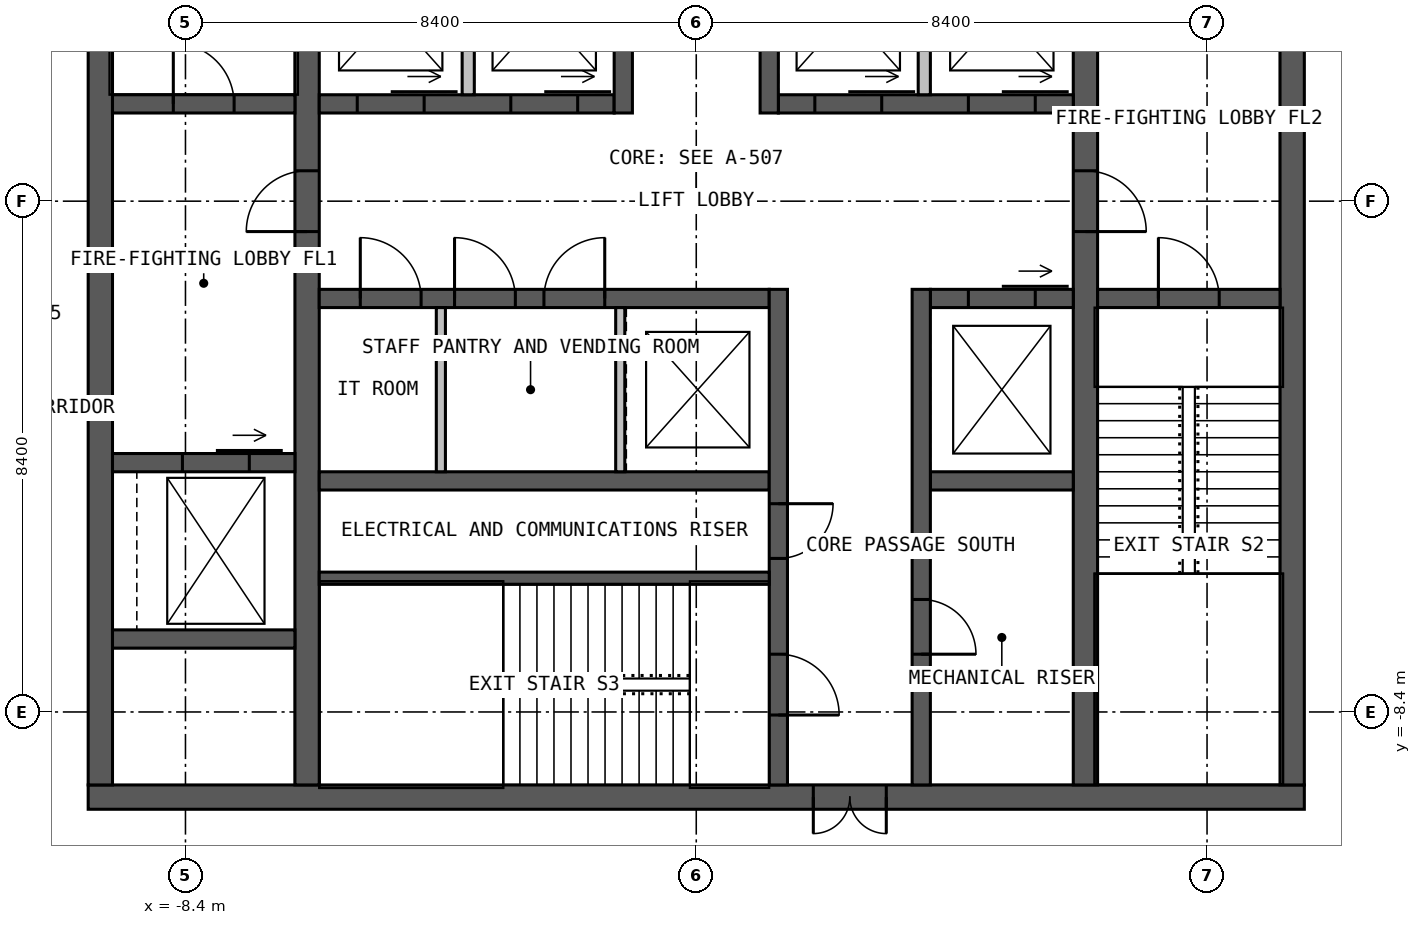
"""IFC4 building model, lengths in metres.
Left out: names, types, materials, properties, quantities, classifications, styles, units other than length and angle.
Written with IfcOpenShell. Run it as: python <this file> out.ifc"""

import sys

from ifc_helpers import new_model, si_unit, direction, frame, frame_2d, origin, place, context, subcontext, project, spatial, rectangle, extrude, element, fill, save


model = new_model("IFC4")
c1 = context("Model", 3, precision=1e-05, world=origin(), true_north=direction((0.0, 1.0)))
c2 = subcontext(c1, "Body", "Model", "MODEL_VIEW")
j1 = project(units=[si_unit("LENGTHUNIT", "METRE"), si_unit("PLANEANGLEUNIT", "RADIAN")], contexts=[c1])
p1 = place(None, origin())
s1 = spatial("IfcSite", under=j1, at=p1, CompositionType="ELEMENT")
p2 = place(p1, origin())
s2 = spatial("IfcBuilding", under=s1, at=p2, CompositionType="ELEMENT")
p3 = place(p2, frame((0.0, 0.0, 280.0)))
s3 = spatial("IfcBuildingStorey", under=s2, at=p3, CompositionType="ELEMENT", Elevation=280.0)
p4 = place(p3, frame((10.0, -9.8, 0.0), z_axis=(0.0, 0.0, 1.0), x_axis=(-1.0, 0.0, 0.0)))
e1 = element("IfcWall", 1, at=p4, inside=s3, PredefinedType="SOLIDWALL", context=c2, shape_type="SweptSolid", body=[
    extrude(rectangle(XDim=20.0, YDim=0.4, at=frame_2d((10.0, 0.0))), origin(), (0.0, 0.0, 1.0), 4.0),
])
p5 = place(p4, frame((6.875, 0.0, 0.0)))
e2 = element("IfcOpeningElement", 2, at=p5, cuts=e1, PredefinedType="OPENING", context=c2, shape_type="SweptSolid", body=[
    extrude(rectangle(XDim=1.2, YDim=2.2, at=frame_2d((0.6, 1.1))), frame((0.0, 0.21, 0.0), z_axis=(0.0, -1.0, 0.0), x_axis=(1.0, 0.0, 0.0)), (0.0, 0.0, 1.0), 0.42),
])
for number, where, z_axis, x_axis in (
    (3, (9.8, -9.6, 0.0), (0.0, 0.0, 1.0), (0.0, 1.0, 0.0)),
    (4, (-9.8, 9.6, 0.0), (0.0, 0.0, 1.0), (0.0, -1.0, 0.0)),
):
    element("IfcWall", number, at=place(p3, frame(where, z_axis=z_axis, x_axis=x_axis)), inside=s3, PredefinedType="SOLIDWALL", context=c2, shape_type="SweptSolid", body=[
        extrude(rectangle(XDim=19.2, YDim=0.4, at=frame_2d((9.6, 0.0))), origin(), (0.0, 0.0, 1.0), 4.0),
    ])
p6 = place(p3, frame((-6.4, -9.6, 0.0), z_axis=(0.0, 0.0, 1.0), x_axis=(0.0, 1.0, 0.0)))
e5 = element("IfcWall", 5, at=p6, inside=s3, PredefinedType="SOLIDWALL", context=c2, shape_type="SweptSolid", body=[
    extrude(rectangle(XDim=19.2, YDim=0.4, at=frame_2d((9.6, 0.0))), origin(), (0.0, 0.0, 1.0), 4.0),
])
p7 = place(p6, frame((9.1, 0.0, 0.0)))
e6 = element("IfcOpeningElement", 6, at=p7, cuts=e5, PredefinedType="OPENING", context=c2, shape_type="SweptSolid", body=[
    extrude(rectangle(XDim=1.0, YDim=2.2, at=frame_2d((0.5, 1.1))), frame((0.0, 0.21, 0.0), z_axis=(0.0, -1.0, 0.0), x_axis=(1.0, 0.0, 0.0)), (0.0, 0.0, 1.0), 0.42),
])
p8 = place(p3, frame((6.4, 9.6, 0.0), z_axis=(0.0, 0.0, 1.0), x_axis=(0.0, -1.0, 0.0)))
e7 = element("IfcWall", 7, at=p8, inside=s3, PredefinedType="SOLIDWALL", context=c2, shape_type="SweptSolid", body=[
    extrude(rectangle(XDim=19.2, YDim=0.4, at=frame_2d((9.6, 0.0))), origin(), (0.0, 0.0, 1.0), 4.0),
])
p9 = place(p8, frame((9.1, 0.0, 0.0)))
e8 = element("IfcOpeningElement", 8, at=p9, cuts=e7, PredefinedType="OPENING", context=c2, shape_type="SweptSolid", body=[
    extrude(rectangle(XDim=1.0, YDim=2.2, at=frame_2d((0.5, 1.1))), frame((0.0, 0.21, 0.0), z_axis=(0.0, -1.0, 0.0), x_axis=(1.0, 0.0, 0.0)), (0.0, 0.0, 1.0), 0.42),
])
p10 = place(p3, frame((-6.2, 1.6, 0.0), z_axis=(0.0, 0.0, 1.0), x_axis=(1.0, 0.0, 0.0)))
e9 = element("IfcWall", 9, at=p10, inside=s3, PredefinedType="SOLIDWALL", context=c2, shape_type="SweptSolid", body=[
    extrude(rectangle(XDim=4.85, YDim=0.3, at=frame_2d((2.425, 0.0))), origin(), (0.0, 0.0, 1.0), 4.0),
])
p11 = place(p10, frame((0.625, 0.0, 0.0)))
e10 = element("IfcOpeningElement", 10, at=p11, cuts=e9, PredefinedType="OPENING", context=c2, shape_type="SweptSolid", body=[
    extrude(rectangle(XDim=1.1, YDim=2.2, at=frame_2d((0.55, 1.1))), frame((0.0, 0.16, 0.0), z_axis=(0.0, -1.0, 0.0), x_axis=(1.0, 0.0, 0.0)), (0.0, 0.0, 1.0), 0.32),
])
p12 = place(p10, frame((3.15, 0.0, 0.0)))
e11 = element("IfcOpeningElement", 11, at=p12, cuts=e9, PredefinedType="OPENING", context=c2, shape_type="SweptSolid", body=[
    extrude(rectangle(XDim=1.1, YDim=2.2, at=frame_2d((0.55, 1.1))), frame((0.0, 0.16, 0.0), z_axis=(0.0, -1.0, 0.0), x_axis=(1.0, 0.0, 0.0)), (0.0, 0.0, 1.0), 0.32),
])
p13 = place(p3, frame((1.35, 1.6, 0.0), z_axis=(0.0, 0.0, 1.0), x_axis=(1.0, 0.0, 0.0)))
e12 = element("IfcWall", 12, at=p13, inside=s3, PredefinedType="SOLIDWALL", context=c2, shape_type="SweptSolid", body=[
    extrude(rectangle(XDim=4.85, YDim=0.3, at=frame_2d((2.425, 0.0))), origin(), (0.0, 0.0, 1.0), 4.0),
])
p14 = place(p13, frame((0.6, 0.0, 0.0)))
e13 = element("IfcOpeningElement", 13, at=p14, cuts=e12, PredefinedType="OPENING", context=c2, shape_type="SweptSolid", body=[
    extrude(rectangle(XDim=1.1, YDim=2.2, at=frame_2d((0.55, 1.1))), frame((0.0, 0.16, 0.0), z_axis=(0.0, -1.0, 0.0), x_axis=(1.0, 0.0, 0.0)), (0.0, 0.0, 1.0), 0.32),
])
p15 = place(p13, frame((3.125, 0.0, 0.0)))
e14 = element("IfcOpeningElement", 14, at=p15, cuts=e12, PredefinedType="OPENING", context=c2, shape_type="SweptSolid", body=[
    extrude(rectangle(XDim=1.1, YDim=2.2, at=frame_2d((0.55, 1.1))), frame((0.0, 0.16, 0.0), z_axis=(0.0, -1.0, 0.0), x_axis=(1.0, 0.0, 0.0)), (0.0, 0.0, 1.0), 0.32),
])
p16 = place(p3, frame((-1.2, 1.45, 0.0), z_axis=(0.0, 0.0, 1.0), x_axis=(0.0, 1.0, 0.0)))
e15 = element("IfcWall", 15, at=p16, inside=s3, PredefinedType="SOLIDWALL", context=c2, shape_type="SweptSolid", body=[
    extrude(rectangle(XDim=8.15, YDim=0.3, at=frame_2d((4.075, 0.0))), origin(), (0.0, 0.0, 1.0), 4.0),
])
p17 = place(p16, frame((5.05, 0.0, 0.0)))
e16 = element("IfcOpeningElement", 16, at=p17, cuts=e15, PredefinedType="OPENING", context=c2, shape_type="SweptSolid", body=[
    extrude(rectangle(XDim=1.0, YDim=2.2, at=frame_2d((0.5, 1.1))), frame((0.0, 0.16, 0.0), z_axis=(0.0, -1.0, 0.0), x_axis=(1.0, 0.0, 0.0)), (0.0, 0.0, 1.0), 0.32),
])
p18 = place(p3, frame((1.2, 1.45, 0.0), z_axis=(0.0, 0.0, 1.0), x_axis=(0.0, 1.0, 0.0)))
e17 = element("IfcWall", 17, at=p18, inside=s3, PredefinedType="SOLIDWALL", context=c2, shape_type="SweptSolid", body=[
    extrude(rectangle(XDim=8.15, YDim=0.3, at=frame_2d((4.075, 0.0))), origin(), (0.0, 0.0, 1.0), 4.0),
])
p19 = place(p18, frame((3.8, 0.0, 0.0)))
e18 = element("IfcOpeningElement", 18, at=p19, cuts=e17, PredefinedType="OPENING", context=c2, shape_type="SweptSolid", body=[
    extrude(rectangle(XDim=1.0, YDim=2.2, at=frame_2d((0.5, 1.1))), frame((0.0, 0.16, 0.0), z_axis=(0.0, -1.0, 0.0), x_axis=(1.0, 0.0, 0.0)), (0.0, 0.0, 1.0), 0.32),
])
p20 = place(p18, frame((6.15, 0.0, 0.0)))
e19 = element("IfcOpeningElement", 19, at=p20, cuts=e17, PredefinedType="OPENING", context=c2, shape_type="SweptSolid", body=[
    extrude(rectangle(XDim=1.0, YDim=2.2, at=frame_2d((0.5, 1.1))), frame((0.0, 0.16, 0.0), z_axis=(0.0, -1.0, 0.0), x_axis=(1.0, 0.0, 0.0)), (0.0, 0.0, 1.0), 0.32),
])
p21 = place(p3, frame((-6.2, -1.6, 0.0), z_axis=(0.0, 0.0, 1.0), x_axis=(1.0, 0.0, 0.0)))
e20 = element("IfcWall", 20, at=p21, inside=s3, PredefinedType="SOLIDWALL", context=c2, shape_type="SweptSolid", body=[
    extrude(rectangle(XDim=7.4, YDim=0.3, at=frame_2d((3.7, 0.0))), origin(), (0.0, 0.0, 1.0), 4.0),
])
p22 = place(p21, frame((0.675, 0.0, 0.0)))
e21 = element("IfcOpeningElement", 21, at=p22, cuts=e20, PredefinedType="OPENING", context=c2, shape_type="SweptSolid", body=[
    extrude(rectangle(XDim=1.0, YDim=2.2, at=frame_2d((0.5, 1.1))), frame((0.0, 0.16, 0.0), z_axis=(0.0, -1.0, 0.0), x_axis=(1.0, 0.0, 0.0)), (0.0, 0.0, 1.0), 0.32),
])
p23 = place(p21, frame((2.225, 0.0, 0.0)))
e22 = element("IfcOpeningElement", 22, at=p23, cuts=e20, PredefinedType="OPENING", context=c2, shape_type="SweptSolid", body=[
    extrude(rectangle(XDim=1.0, YDim=2.2, at=frame_2d((0.5, 1.1))), frame((0.0, 0.16, 0.0), z_axis=(0.0, -1.0, 0.0), x_axis=(1.0, 0.0, 0.0)), (0.0, 0.0, 1.0), 0.32),
])
p24 = place(p21, frame((3.695, 0.0, 0.0)))
e23 = element("IfcOpeningElement", 23, at=p24, cuts=e20, PredefinedType="OPENING", context=c2, shape_type="SweptSolid", body=[
    extrude(rectangle(XDim=1.0, YDim=2.2, at=frame_2d((0.5, 1.1))), frame((0.0, 0.16, 0.0), z_axis=(0.0, -1.0, 0.0), x_axis=(1.0, 0.0, 0.0)), (0.0, 0.0, 1.0), 0.32),
])
p25 = place(p3, frame((3.85, -1.6, 0.0), z_axis=(0.0, 0.0, 1.0), x_axis=(1.0, 0.0, 0.0)))
e24 = element("IfcWall", 24, at=p25, inside=s3, PredefinedType="SOLIDWALL", context=c2, shape_type="SweptSolid", body=[
    extrude(rectangle(XDim=2.35, YDim=0.3, at=frame_2d((1.175, 0.0))), origin(), (0.0, 0.0, 1.0), 4.0),
])
p26 = place(p25, frame((0.625, 0.0, 0.0)))
e25 = element("IfcOpeningElement", 25, at=p26, cuts=e24, PredefinedType="OPENING", context=c2, shape_type="SweptSolid", body=[
    extrude(rectangle(XDim=1.1, YDim=2.2, at=frame_2d((0.55, 1.1))), frame((0.0, 0.16, 0.0), z_axis=(0.0, -1.0, 0.0), x_axis=(1.0, 0.0, 0.0)), (0.0, 0.0, 1.0), 0.32),
])
p27 = place(p3, frame((-6.2, -4.6, 0.0), z_axis=(0.0, 0.0, 1.0), x_axis=(1.0, 0.0, 0.0)))
e26 = element("IfcWall", 26, at=p27, inside=s3, PredefinedType="SOLIDWALL", context=c2, shape_type="SweptSolid", body=[
    extrude(rectangle(XDim=7.4, YDim=0.3, at=frame_2d((3.7, 0.0))), origin(), (0.0, 0.0, 1.0), 4.0),
])
p28 = place(p3, frame((3.85, -4.6, 0.0), z_axis=(0.0, 0.0, 1.0), x_axis=(1.0, 0.0, 0.0)))
e27 = element("IfcWall", 27, at=p28, inside=s3, PredefinedType="SOLIDWALL", context=c2, shape_type="SweptSolid", body=[
    extrude(rectangle(XDim=2.35, YDim=0.3, at=frame_2d((1.175, 0.0))), origin(), (0.0, 0.0, 1.0), 4.0),
])
p29 = place(p3, frame((1.35, -1.45, 0.0), z_axis=(0.0, 0.0, 1.0), x_axis=(0.0, -1.0, 0.0)))
e28 = element("IfcWall", 28, at=p29, inside=s3, PredefinedType="SOLIDWALL", context=c2, shape_type="SweptSolid", body=[
    extrude(rectangle(XDim=8.15, YDim=0.3, at=frame_2d((4.075, 0.0))), origin(), (0.0, 0.0, 1.0), 4.0),
])
p30 = place(p29, frame((6.0, 0.0, 0.0)))
e29 = element("IfcOpeningElement", 29, at=p30, cuts=e28, PredefinedType="OPENING", context=c2, shape_type="SweptSolid", body=[
    extrude(rectangle(XDim=1.0, YDim=2.2, at=frame_2d((0.5, 1.1))), frame((0.0, 0.16, 0.0), z_axis=(0.0, -1.0, 0.0), x_axis=(1.0, 0.0, 0.0)), (0.0, 0.0, 1.0), 0.32),
])
p31 = place(p29, frame((3.525, 0.0, 0.0)))
e30 = element("IfcOpeningElement", 30, at=p31, cuts=e28, PredefinedType="OPENING", context=c2, shape_type="SweptSolid", body=[
    extrude(rectangle(XDim=0.9, YDim=2.2, at=frame_2d((0.45, 1.1))), frame((0.0, 0.16, 0.0), z_axis=(0.0, -1.0, 0.0), x_axis=(1.0, 0.0, 0.0)), (0.0, 0.0, 1.0), 0.32),
])
p32 = place(p3, frame((3.7, -1.45, 0.0), z_axis=(0.0, 0.0, 1.0), x_axis=(0.0, -1.0, 0.0)))
e31 = element("IfcWall", 31, at=p32, inside=s3, PredefinedType="SOLIDWALL", context=c2, shape_type="SweptSolid", body=[
    extrude(rectangle(XDim=8.15, YDim=0.3, at=frame_2d((4.075, 0.0))), origin(), (0.0, 0.0, 1.0), 4.0),
])
p33 = place(p32, frame((5.1, 0.0, 0.0)))
e32 = element("IfcOpeningElement", 32, at=p33, cuts=e31, PredefinedType="OPENING", context=c2, shape_type="SweptSolid", body=[
    extrude(rectangle(XDim=0.9, YDim=2.2, at=frame_2d((0.45, 1.1))), frame((0.0, 0.16, 0.0), z_axis=(0.0, -1.0, 0.0), x_axis=(1.0, 0.0, 0.0)), (0.0, 0.0, 1.0), 0.32),
])
p34 = place(p3, frame((-6.2, -6.2, 0.0), z_axis=(0.0, 0.0, 1.0), x_axis=(1.0, 0.0, 0.0)))
e33 = element("IfcWall", 33, at=p34, inside=s3, PredefinedType="SOLIDWALL", context=c2, shape_type="SweptSolid", body=[
    extrude(rectangle(XDim=7.4, YDim=0.2, at=frame_2d((3.7, 0.0))), origin(), (0.0, 0.0, 1.0), 4.0),
])
p35 = place(p3, frame((-9.6, 1.6, 0.0), z_axis=(0.0, 0.0, 1.0), x_axis=(1.0, 0.0, 0.0)))
e34 = element("IfcWall", 34, at=p35, inside=s3, PredefinedType="SOLIDWALL", context=c2, shape_type="SweptSolid", body=[
    extrude(rectangle(XDim=3.0, YDim=0.3, at=frame_2d((1.5, 0.0))), origin(), (0.0, 0.0, 1.0), 4.0),
])
p36 = place(p35, frame((1.0, 0.0, 0.0)))
e35 = element("IfcOpeningElement", 35, at=p36, cuts=e34, PredefinedType="OPENING", context=c2, shape_type="SweptSolid", body=[
    extrude(rectangle(XDim=1.0, YDim=2.2, at=frame_2d((0.5, 1.1))), frame((0.0, 0.16, 0.0), z_axis=(0.0, -1.0, 0.0), x_axis=(1.0, 0.0, 0.0)), (0.0, 0.0, 1.0), 0.32),
])
p37 = place(p3, frame((6.6, -1.6, 0.0), z_axis=(0.0, 0.0, 1.0), x_axis=(1.0, 0.0, 0.0)))
e36 = element("IfcWall", 36, at=p37, inside=s3, PredefinedType="SOLIDWALL", context=c2, shape_type="SweptSolid", body=[
    extrude(rectangle(XDim=3.0, YDim=0.3, at=frame_2d((1.5, 0.0))), origin(), (0.0, 0.0, 1.0), 4.0),
])
p38 = place(p37, frame((1.0, 0.0, 0.0)))
e37 = element("IfcOpeningElement", 37, at=p38, cuts=e36, PredefinedType="OPENING", context=c2, shape_type="SweptSolid", body=[
    extrude(rectangle(XDim=1.0, YDim=2.2, at=frame_2d((0.5, 1.1))), frame((0.0, 0.16, 0.0), z_axis=(0.0, -1.0, 0.0), x_axis=(1.0, 0.0, 0.0)), (0.0, 0.0, 1.0), 0.32),
])
p39 = place(p3, frame((-9.6, -4.3, 0.0), z_axis=(0.0, 0.0, 1.0), x_axis=(1.0, 0.0, 0.0)))
e38 = element("IfcWall", 38, at=p39, inside=s3, PredefinedType="SOLIDWALL", context=c2, shape_type="SweptSolid", body=[
    extrude(rectangle(XDim=3.0, YDim=0.3, at=frame_2d((1.5, 0.0))), origin(), (0.0, 0.0, 1.0), 4.0),
])
p40 = place(p39, frame((1.15, 0.0, 0.0)))
e39 = element("IfcOpeningElement", 39, at=p40, cuts=e38, PredefinedType="OPENING", context=c2, shape_type="SweptSolid", body=[
    extrude(rectangle(XDim=1.1, YDim=2.2, at=frame_2d((0.55, 1.1))), frame((0.0, 0.16, 0.0), z_axis=(0.0, -1.0, 0.0), x_axis=(1.0, 0.0, 0.0)), (0.0, 0.0, 1.0), 0.32),
])
p41 = place(p3, frame((-9.6, -7.2, 0.0), z_axis=(0.0, 0.0, 1.0), x_axis=(1.0, 0.0, 0.0)))
e40 = element("IfcWall", 40, at=p41, inside=s3, PredefinedType="SOLIDWALL", context=c2, shape_type="SweptSolid", body=[
    extrude(rectangle(XDim=3.0, YDim=0.3, at=frame_2d((1.5, 0.0))), origin(), (0.0, 0.0, 1.0), 4.0),
])
for number, where, z_axis, x_axis in (
    (41, (-3.75, 1.75, 0.0), (0.0, 0.0, 1.0), (0.0, 1.0, 0.0)),
    (42, (3.75, 1.75, 0.0), (0.0, 0.0, 1.0), (0.0, 1.0, 0.0)),
):
    element("IfcWall", number, at=place(p3, frame(where, z_axis=z_axis, x_axis=x_axis)), inside=s3, PredefinedType="SOLIDWALL", context=c2, shape_type="SweptSolid", body=[
        extrude(rectangle(XDim=2.7, YDim=0.2, at=frame_2d((1.35, 0.0))), origin(), (0.0, 0.0, 1.0), 3.75),
    ])
for number, where, z_axis, x_axis in (
    (43, (-4.2, -1.75, 0.0), (0.0, 0.0, 1.0), (0.0, -1.0, 0.0)),
    (44, (-1.25, -1.75, 0.0), (0.0, 0.0, 1.0), (0.0, -1.0, 0.0)),
):
    element("IfcWall", number, at=place(p3, frame(where, z_axis=z_axis, x_axis=x_axis)), inside=s3, PredefinedType="PARTITIONING", context=c2, shape_type="SweptSolid", body=[
        extrude(rectangle(XDim=2.7, YDim=0.15, at=frame_2d((1.35, 0.0))), origin(), (0.0, 0.0, 1.0), 3.75),
    ])
p42 = place(p5, origin())
e45 = element("IfcDoor", 45, at=p42, inside=s3, OperationType="DOUBLE_DOOR_SINGLE_SWING", PredefinedType="DOOR", context=c2, shape_type="SweptSolid", body=[
    extrude(rectangle(XDim=1.2, YDim=2.2, at=frame_2d((0.6, 1.1))), frame((0.0, 0.025, 0.0), z_axis=(0.0, -1.0, 0.0), x_axis=(1.0, 0.0, 0.0)), (0.0, 0.0, 1.0), 0.05),
])
fill(e2, e45)
p43 = place(p7, origin())
e46 = element("IfcDoor", 46, at=p43, inside=s3, OperationType="SINGLE_SWING_LEFT", PredefinedType="DOOR", context=c2, shape_type="SweptSolid", body=[
    extrude(rectangle(XDim=1.0, YDim=2.2, at=frame_2d((0.5, 1.1))), frame((0.0, 0.025, 0.0), z_axis=(0.0, -1.0, 0.0), x_axis=(1.0, 0.0, 0.0)), (0.0, 0.0, 1.0), 0.05),
])
fill(e6, e46)
p44 = place(p9, origin())
e47 = element("IfcDoor", 47, at=p44, inside=s3, OperationType="SINGLE_SWING_RIGHT", PredefinedType="DOOR", context=c2, shape_type="SweptSolid", body=[
    extrude(rectangle(XDim=1.0, YDim=2.2, at=frame_2d((0.5, 1.1))), frame((0.0, 0.025, 0.0), z_axis=(0.0, -1.0, 0.0), x_axis=(1.0, 0.0, 0.0)), (0.0, 0.0, 1.0), 0.05),
])
fill(e8, e47)
p45 = place(p36, origin())
e48 = element("IfcDoor", 48, at=p45, inside=s3, OperationType="SINGLE_SWING_LEFT", PredefinedType="DOOR", context=c2, shape_type="SweptSolid", body=[
    extrude(rectangle(XDim=1.0, YDim=2.2, at=frame_2d((0.5, 1.1))), frame((0.0, 0.025, 0.0), z_axis=(0.0, -1.0, 0.0), x_axis=(1.0, 0.0, 0.0)), (0.0, 0.0, 1.0), 0.05),
])
fill(e35, e48)
p46 = place(p38, origin())
e49 = element("IfcDoor", 49, at=p46, inside=s3, OperationType="SINGLE_SWING_LEFT", PredefinedType="DOOR", context=c2, shape_type="SweptSolid", body=[
    extrude(rectangle(XDim=1.0, YDim=2.2, at=frame_2d((0.5, 1.1))), frame((0.0, 0.025, 0.0), z_axis=(0.0, -1.0, 0.0), x_axis=(1.0, 0.0, 0.0)), (0.0, 0.0, 1.0), 0.05),
])
fill(e37, e49)
p47 = place(p30, origin())
e50 = element("IfcDoor", 50, at=p47, inside=s3, OperationType="SINGLE_SWING_RIGHT", PredefinedType="DOOR", context=c2, shape_type="SweptSolid", body=[
    extrude(rectangle(XDim=1.0, YDim=2.2, at=frame_2d((0.5, 1.1))), frame((0.0, 0.025, 0.0), z_axis=(0.0, -1.0, 0.0), x_axis=(1.0, 0.0, 0.0)), (0.0, 0.0, 1.0), 0.05),
])
fill(e29, e50)
p48 = place(p31, origin())
e51 = element("IfcDoor", 51, at=p48, inside=s3, OperationType="SINGLE_SWING_LEFT", PredefinedType="DOOR", context=c2, shape_type="SweptSolid", body=[
    extrude(rectangle(XDim=0.9, YDim=2.2, at=frame_2d((0.45, 1.1))), frame((0.0, 0.025, 0.0), z_axis=(0.0, -1.0, 0.0), x_axis=(1.0, 0.0, 0.0)), (0.0, 0.0, 1.0), 0.05),
])
fill(e30, e51)
p49 = place(p33, origin())
e52 = element("IfcDoor", 52, at=p49, inside=s3, OperationType="SINGLE_SWING_RIGHT", PredefinedType="DOOR", context=c2, shape_type="SweptSolid", body=[
    extrude(rectangle(XDim=0.9, YDim=2.2, at=frame_2d((0.45, 1.1))), frame((0.0, 0.025, 0.0), z_axis=(0.0, -1.0, 0.0), x_axis=(1.0, 0.0, 0.0)), (0.0, 0.0, 1.0), 0.05),
])
fill(e32, e52)
p50 = place(p22, origin())
e53 = element("IfcDoor", 53, at=p50, inside=s3, OperationType="SINGLE_SWING_LEFT", PredefinedType="DOOR", context=c2, shape_type="SweptSolid", body=[
    extrude(rectangle(XDim=1.0, YDim=2.2, at=frame_2d((0.5, 1.1))), frame((0.0, 0.025, 0.0), z_axis=(0.0, -1.0, 0.0), x_axis=(1.0, 0.0, 0.0)), (0.0, 0.0, 1.0), 0.05),
])
fill(e21, e53)
p51 = place(p23, origin())
e54 = element("IfcDoor", 54, at=p51, inside=s3, OperationType="SINGLE_SWING_LEFT", PredefinedType="DOOR", context=c2, shape_type="SweptSolid", body=[
    extrude(rectangle(XDim=1.0, YDim=2.2, at=frame_2d((0.5, 1.1))), frame((0.0, 0.025, 0.0), z_axis=(0.0, -1.0, 0.0), x_axis=(1.0, 0.0, 0.0)), (0.0, 0.0, 1.0), 0.05),
])
fill(e22, e54)
p52 = place(p24, origin())
e55 = element("IfcDoor", 55, at=p52, inside=s3, OperationType="SINGLE_SWING_RIGHT", PredefinedType="DOOR", context=c2, shape_type="SweptSolid", body=[
    extrude(rectangle(XDim=1.0, YDim=2.2, at=frame_2d((0.5, 1.1))), frame((0.0, 0.025, 0.0), z_axis=(0.0, -1.0, 0.0), x_axis=(1.0, 0.0, 0.0)), (0.0, 0.0, 1.0), 0.05),
])
fill(e23, e55)
p53 = place(p11, origin())
e56 = element("IfcDoor", 56, at=p53, inside=s3, OperationType="SLIDING_TO_LEFT", PredefinedType="DOOR", context=c2, shape_type="SweptSolid", body=[
    extrude(rectangle(XDim=1.1, YDim=2.2, at=frame_2d((0.55, 1.1))), frame((0.0, 0.025, 0.0), z_axis=(0.0, -1.0, 0.0), x_axis=(1.0, 0.0, 0.0)), (0.0, 0.0, 1.0), 0.05),
])
fill(e10, e56)
p54 = place(p12, origin())
e57 = element("IfcDoor", 57, at=p54, inside=s3, OperationType="SLIDING_TO_LEFT", PredefinedType="DOOR", context=c2, shape_type="SweptSolid", body=[
    extrude(rectangle(XDim=1.1, YDim=2.2, at=frame_2d((0.55, 1.1))), frame((0.0, 0.025, 0.0), z_axis=(0.0, -1.0, 0.0), x_axis=(1.0, 0.0, 0.0)), (0.0, 0.0, 1.0), 0.05),
])
fill(e11, e57)
p55 = place(p14, origin())
e58 = element("IfcDoor", 58, at=p55, inside=s3, OperationType="SLIDING_TO_LEFT", PredefinedType="DOOR", context=c2, shape_type="SweptSolid", body=[
    extrude(rectangle(XDim=1.1, YDim=2.2, at=frame_2d((0.55, 1.1))), frame((0.0, 0.025, 0.0), z_axis=(0.0, -1.0, 0.0), x_axis=(1.0, 0.0, 0.0)), (0.0, 0.0, 1.0), 0.05),
])
fill(e13, e58)
p56 = place(p15, origin())
e59 = element("IfcDoor", 59, at=p56, inside=s3, OperationType="SLIDING_TO_LEFT", PredefinedType="DOOR", context=c2, shape_type="SweptSolid", body=[
    extrude(rectangle(XDim=1.1, YDim=2.2, at=frame_2d((0.55, 1.1))), frame((0.0, 0.025, 0.0), z_axis=(0.0, -1.0, 0.0), x_axis=(1.0, 0.0, 0.0)), (0.0, 0.0, 1.0), 0.05),
])
fill(e14, e59)
p57 = place(p26, origin())
e60 = element("IfcDoor", 60, at=p57, inside=s3, OperationType="SLIDING_TO_LEFT", PredefinedType="DOOR", context=c2, shape_type="SweptSolid", body=[
    extrude(rectangle(XDim=1.1, YDim=2.2, at=frame_2d((0.55, 1.1))), frame((0.0, 0.025, 0.0), z_axis=(0.0, -1.0, 0.0), x_axis=(1.0, 0.0, 0.0)), (0.0, 0.0, 1.0), 0.05),
])
fill(e25, e60)
p58 = place(p40, origin())
e61 = element("IfcDoor", 61, at=p58, inside=s3, OperationType="SLIDING_TO_LEFT", PredefinedType="DOOR", context=c2, shape_type="SweptSolid", body=[
    extrude(rectangle(XDim=1.1, YDim=2.2, at=frame_2d((0.55, 1.1))), frame((0.0, 0.025, 0.0), z_axis=(0.0, -1.0, 0.0), x_axis=(1.0, 0.0, 0.0)), (0.0, 0.0, 1.0), 0.05),
])
fill(e39, e61)
save(model, sys.argv[1])
